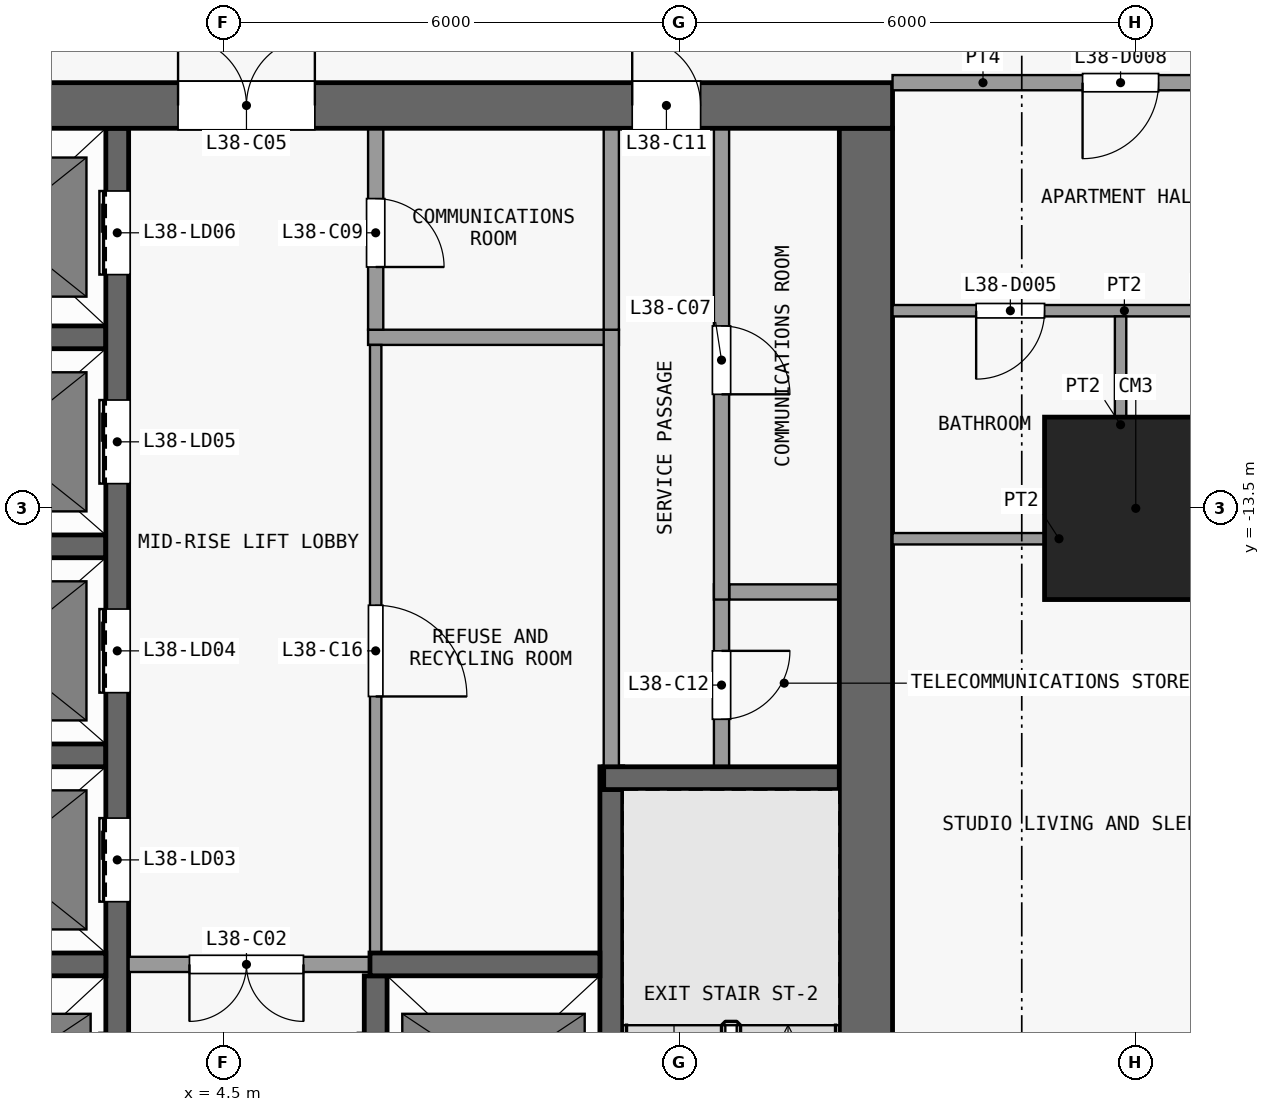
"""IFC4 building model, lengths in metres.
Left out: names, types, materials, properties, quantities, classifications, styles, units other than length and angle.
Written with IfcOpenShell. Run it as: python <this file> out.ifc"""

import sys

from ifc_helpers import new_model, si_unit, direction, frame, frame_2d, origin, origin_2d, place, context, subcontext, project, spatial, rectangle, extrude, element, fill, save


model = new_model("IFC4")
c1 = context("Model", 3, precision=1e-05, world=origin(), true_north=direction((0.0, 1.0)))
c2 = subcontext(c1, "Body", "Model", "MODEL_VIEW")
j1 = project(units=[si_unit("LENGTHUNIT", "METRE"), si_unit("PLANEANGLEUNIT", "RADIAN")], contexts=[c1])
p1 = place(None, origin())
s1 = spatial("IfcSite", under=j1, at=p1, CompositionType="ELEMENT")
p2 = place(p1, origin())
s2 = spatial("IfcBuilding", under=s1, at=p2, CompositionType="ELEMENT")
p3 = place(p2, frame((0.0, 0.0, 156.5)))
s3 = spatial("IfcBuildingStorey", under=s2, at=p3, CompositionType="ELEMENT", Elevation=156.5)
p4 = place(p3, frame((16.5, -13.5, 0.0), z_axis=(0.0, 0.0, 1.0), x_axis=(1.0, 0.0, 0.0)))
e1 = element("IfcColumn", 1, at=p4, inside=s3, PredefinedType="COLUMN", context=c2, shape_type="SweptSolid", body=[
    extrude(rectangle(XDim=2.4, YDim=2.4, at=origin_2d()), origin(), (0.0, 0.0, 1.0), 3.6),
])
p5 = place(p3, frame((-13.3, -8.2, 0.0), z_axis=(0.0, 0.0, 1.0), x_axis=(1.0, 0.0, 0.0)))
e2 = element("IfcWall", 2, at=p5, inside=s3, PredefinedType="SHEAR", context=c2, shape_type="SweptSolid", body=[
    extrude(rectangle(XDim=26.6, YDim=0.6, at=frame_2d((13.3, 0.0))), origin(), (0.0, 0.0, 1.0), 3.3),
])
p6 = place(p5, frame((7.6, 0.0, 0.0)))
e3 = element("IfcOpeningElement", 3, at=p6, cuts=e2, PredefinedType="OPENING", context=c2, shape_type="SweptSolid", body=[
    extrude(rectangle(XDim=1.8, YDim=2.1, at=frame_2d((0.9, 1.05))), frame((0.0, 0.31, 0.0), z_axis=(0.0, -1.0, 0.0), x_axis=(1.0, 0.0, 0.0)), (0.0, 0.0, 1.0), 0.62),
])
p7 = place(p5, frame((17.2, 0.0, 0.0)))
e4 = element("IfcOpeningElement", 4, at=p7, cuts=e2, PredefinedType="OPENING", context=c2, shape_type="SweptSolid", body=[
    extrude(rectangle(XDim=1.8, YDim=2.1, at=frame_2d((0.9, 1.05))), frame((0.0, 0.31, 0.0), z_axis=(0.0, -1.0, 0.0), x_axis=(1.0, 0.0, 0.0)), (0.0, 0.0, 1.0), 0.62),
])
p8 = place(p5, frame((1.525, 0.0, 0.0)))
e5 = element("IfcOpeningElement", 5, at=p8, cuts=e2, PredefinedType="OPENING", context=c2, shape_type="SweptSolid", body=[
    extrude(rectangle(XDim=1.2, YDim=2.1, at=frame_2d((0.6, 1.05))), frame((0.0, 0.31, 0.0), z_axis=(0.0, -1.0, 0.0), x_axis=(1.0, 0.0, 0.0)), (0.0, 0.0, 1.0), 0.62),
])
p9 = place(p5, frame((23.175, 0.0, 0.0)))
e6 = element("IfcOpeningElement", 6, at=p9, cuts=e2, PredefinedType="OPENING", context=c2, shape_type="SweptSolid", body=[
    extrude(rectangle(XDim=0.9, YDim=2.1, at=frame_2d((0.45, 1.05))), frame((0.0, 0.31, 0.0), z_axis=(0.0, -1.0, 0.0), x_axis=(1.0, 0.0, 0.0)), (0.0, 0.0, 1.0), 0.62),
])
p10 = place(p3, frame((12.95, -24.6, 0.0), z_axis=(0.0, 0.0, 1.0), x_axis=(0.0, 1.0, 0.0)))
e7 = element("IfcWall", 7, at=p10, inside=s3, PredefinedType="SHEAR", context=c2, shape_type="SweptSolid", body=[
    extrude(rectangle(XDim=16.1, YDim=0.7, at=frame_2d((8.05, 0.0))), origin(), (0.0, 0.0, 1.0), 3.3),
])
p11 = place(p3, frame((0.15, -19.5, 0.0), z_axis=(0.0, 0.0, 1.0), x_axis=(1.0, 0.0, 0.0)))
e8 = element("IfcWall", 8, at=p11, inside=s3, PredefinedType="SHEAR", context=c2, shape_type="SweptSolid", body=[
    extrude(rectangle(XDim=2.8, YDim=0.3, at=frame_2d((1.4, 0.0))), origin(), (0.0, 0.0, 1.0), 3.3),
])
p12 = place(p3, frame((6.575, -19.5, 0.0), z_axis=(0.0, 0.0, 1.0), x_axis=(-1.0, 0.0, 0.0)))
e9 = element("IfcWall", 9, at=p12, inside=s3, PredefinedType="PARTITIONING", context=c2, shape_type="SweptSolid", body=[
    extrude(rectangle(XDim=3.325, YDim=0.2, at=frame_2d((1.663, 0.0))), origin(), (0.0, 0.0, 1.0), 3.3),
])
p13 = place(p12, frame((1.025, 0.0, 0.0)))
e10 = element("IfcOpeningElement", 10, at=p13, cuts=e9, PredefinedType="OPENING", context=c2, shape_type="SweptSolid", body=[
    extrude(rectangle(XDim=1.5, YDim=2.1, at=frame_2d((0.75, 1.05))), frame((0.0, 0.11, 0.0), z_axis=(0.0, -1.0, 0.0), x_axis=(1.0, 0.0, 0.0)), (0.0, 0.0, 1.0), 0.22),
])
p14 = place(p3, frame((6.425, -19.5, 0.0), z_axis=(0.0, 0.0, 1.0), x_axis=(1.0, 0.0, 0.0)))
e11 = element("IfcWall", 11, at=p14, inside=s3, PredefinedType="SHEAR", context=c2, shape_type="SweptSolid", body=[
    extrude(rectangle(XDim=3.025, YDim=0.3, at=frame_2d((1.512, 0.0))), origin(), (0.0, 0.0, 1.0), 3.3),
])
p15 = place(p3, frame((9.5, -17.05, 0.0), z_axis=(0.0, 0.0, 1.0), x_axis=(1.0, 0.0, 0.0)))
e12 = element("IfcWall", 12, at=p15, inside=s3, PredefinedType="SHEAR", context=c2, shape_type="SweptSolid", body=[
    extrude(rectangle(XDim=3.1, YDim=0.3, at=frame_2d((1.55, 0.0))), origin(), (0.0, 0.0, 1.0), 3.3),
])
p16 = place(p3, frame((0.15, -16.75, 0.0), z_axis=(0.0, 0.0, 1.0), x_axis=(1.0, 0.0, 0.0)))
e13 = element("IfcWall", 13, at=p16, inside=s3, PredefinedType="SHEAR", context=c2, shape_type="SweptSolid", body=[
    extrude(rectangle(XDim=2.8, YDim=0.3, at=frame_2d((1.4, 0.0))), origin(), (0.0, 0.0, 1.0), 3.3),
])
p17 = place(p3, frame((11.15, -14.6, 0.0), z_axis=(0.0, 0.0, 1.0), x_axis=(1.0, 0.0, 0.0)))
e14 = element("IfcWall", 14, at=p17, inside=s3, PredefinedType="PARTITIONING", context=c2, shape_type="SweptSolid", body=[
    extrude(rectangle(XDim=1.45, YDim=0.2, at=frame_2d((0.725, 0.0))), origin(), (0.0, 0.0, 1.0), 3.3),
])
for number, where, z_axis, x_axis in (
    (15, (0.15, -14.0, 0.0), (0.0, 0.0, 1.0), (1.0, 0.0, 0.0)),
    (16, (0.15, -11.25, 0.0), (0.0, 0.0, 1.0), (1.0, 0.0, 0.0)),
):
    element("IfcWall", number, at=place(p3, frame(where, z_axis=z_axis, x_axis=x_axis)), inside=s3, PredefinedType="SHEAR", context=c2, shape_type="SweptSolid", body=[
        extrude(rectangle(XDim=2.8, YDim=0.3, at=frame_2d((1.4, 0.0))), origin(), (0.0, 0.0, 1.0), 3.3),
    ])
p18 = place(p3, frame((6.4, -11.25, 0.0), z_axis=(0.0, 0.0, 1.0), x_axis=(1.0, 0.0, 0.0)))
e17 = element("IfcWall", 17, at=p18, inside=s3, PredefinedType="PARTITIONING", context=c2, shape_type="SweptSolid", body=[
    extrude(rectangle(XDim=3.3, YDim=0.2, at=frame_2d((1.65, 0.0))), origin(), (0.0, 0.0, 1.0), 3.3),
])
p19 = place(p3, frame((3.1, -22.55, 0.0), z_axis=(0.0, 0.0, 1.0), x_axis=(0.0, 1.0, 0.0)))
e18 = element("IfcWall", 18, at=p19, inside=s3, PredefinedType="SHEAR", context=c2, shape_type="SweptSolid", body=[
    extrude(rectangle(XDim=14.05, YDim=0.3, at=frame_2d((7.025, 0.0))), origin(), (0.0, 0.0, 1.0), 3.3),
])
p20 = place(p19, frame((1.05, 0.0, 0.0)))
e19 = element("IfcOpeningElement", 19, at=p20, cuts=e18, PredefinedType="OPENING", context=c2, shape_type="SweptSolid", body=[
    extrude(rectangle(XDim=1.1, YDim=2.1, at=frame_2d((0.55, 1.05))), frame((0.0, 0.16, 0.0), z_axis=(0.0, -1.0, 0.0), x_axis=(1.0, 0.0, 0.0)), (0.0, 0.0, 1.0), 0.32),
])
p21 = place(p19, frame((3.875, 0.0, 0.0)))
e20 = element("IfcOpeningElement", 20, at=p21, cuts=e18, PredefinedType="OPENING", context=c2, shape_type="SweptSolid", body=[
    extrude(rectangle(XDim=1.1, YDim=2.1, at=frame_2d((0.55, 1.05))), frame((0.0, 0.16, 0.0), z_axis=(0.0, -1.0, 0.0), x_axis=(1.0, 0.0, 0.0)), (0.0, 0.0, 1.0), 0.32),
])
p22 = place(p19, frame((6.625, 0.0, 0.0)))
e21 = element("IfcOpeningElement", 21, at=p22, cuts=e18, PredefinedType="OPENING", context=c2, shape_type="SweptSolid", body=[
    extrude(rectangle(XDim=1.1, YDim=2.1, at=frame_2d((0.55, 1.05))), frame((0.0, 0.16, 0.0), z_axis=(0.0, -1.0, 0.0), x_axis=(1.0, 0.0, 0.0)), (0.0, 0.0, 1.0), 0.32),
])
p23 = place(p19, frame((9.375, 0.0, 0.0)))
e22 = element("IfcOpeningElement", 22, at=p23, cuts=e18, PredefinedType="OPENING", context=c2, shape_type="SweptSolid", body=[
    extrude(rectangle(XDim=1.1, YDim=2.1, at=frame_2d((0.55, 1.05))), frame((0.0, 0.16, 0.0), z_axis=(0.0, -1.0, 0.0), x_axis=(1.0, 0.0, 0.0)), (0.0, 0.0, 1.0), 0.32),
])
p24 = place(p19, frame((12.125, 0.0, 0.0)))
e23 = element("IfcOpeningElement", 23, at=p24, cuts=e18, PredefinedType="OPENING", context=c2, shape_type="SweptSolid", body=[
    extrude(rectangle(XDim=1.1, YDim=2.1, at=frame_2d((0.55, 1.05))), frame((0.0, 0.16, 0.0), z_axis=(0.0, -1.0, 0.0), x_axis=(1.0, 0.0, 0.0)), (0.0, 0.0, 1.0), 0.32),
])
p25 = place(p3, frame((6.5, -22.25, 0.0), z_axis=(0.0, 0.0, 1.0), x_axis=(0.0, 1.0, 0.0)))
e24 = element("IfcWall", 24, at=p25, inside=s3, PredefinedType="SHEAR", context=c2, shape_type="SweptSolid", body=[
    extrude(rectangle(XDim=2.6, YDim=0.3, at=frame_2d((1.3, 0.0))), origin(), (0.0, 0.0, 1.0), 3.3),
])
p26 = place(p25, frame((0.75, 0.0, 0.0)))
e25 = element("IfcOpeningElement", 25, at=p26, cuts=e24, PredefinedType="OPENING", context=c2, shape_type="SweptSolid", body=[
    extrude(rectangle(XDim=1.1, YDim=2.1, at=frame_2d((0.55, 1.05))), frame((0.0, 0.16, 0.0), z_axis=(0.0, -1.0, 0.0), x_axis=(1.0, 0.0, 0.0)), (0.0, 0.0, 1.0), 0.32),
])
p27 = place(p3, frame((6.5, -11.35, 0.0), z_axis=(0.0, 0.0, 1.0), x_axis=(0.0, -1.0, 0.0)))
e26 = element("IfcWall", 26, at=p27, inside=s3, PredefinedType="PARTITIONING", context=c2, shape_type="SweptSolid", body=[
    extrude(rectangle(XDim=8.0, YDim=0.15, at=frame_2d((4.0, 0.0))), origin(), (0.0, 0.0, 1.0), 3.3),
])
p28 = place(p27, frame((3.425, 0.0, 0.0)))
e27 = element("IfcOpeningElement", 27, at=p28, cuts=e26, PredefinedType="OPENING", context=c2, shape_type="SweptSolid", body=[
    extrude(rectangle(XDim=1.2, YDim=2.1, at=frame_2d((0.6, 1.05))), frame((0.0, 0.085, 0.0), z_axis=(0.0, -1.0, 0.0), x_axis=(1.0, 0.0, 0.0)), (0.0, 0.0, 1.0), 0.17),
])
p29 = place(p3, frame((6.5, -8.5, 0.0), z_axis=(0.0, 0.0, 1.0), x_axis=(0.0, -1.0, 0.0)))
e28 = element("IfcWall", 28, at=p29, inside=s3, PredefinedType="PARTITIONING", context=c2, shape_type="SweptSolid", body=[
    extrude(rectangle(XDim=2.65, YDim=0.2, at=frame_2d((1.325, 0.0))), origin(), (0.0, 0.0, 1.0), 3.3),
])
p30 = place(p29, frame((0.925, 0.0, 0.0)))
e29 = element("IfcOpeningElement", 29, at=p30, cuts=e28, PredefinedType="OPENING", context=c2, shape_type="SweptSolid", body=[
    extrude(rectangle(XDim=0.9, YDim=2.1, at=frame_2d((0.45, 1.05))), frame((0.0, 0.11, 0.0), z_axis=(0.0, -1.0, 0.0), x_axis=(1.0, 0.0, 0.0)), (0.0, 0.0, 1.0), 0.22),
])
p31 = place(p3, frame((9.6, -16.9, 0.0), z_axis=(0.0, 0.0, 1.0), x_axis=(0.0, -1.0, 0.0)))
e30 = element("IfcWall", 30, at=p31, inside=s3, PredefinedType="SHEAR", context=c2, shape_type="SweptSolid", body=[
    extrude(rectangle(XDim=7.7, YDim=0.3, at=frame_2d((3.85, 0.0))), origin(), (0.0, 0.0, 1.0), 3.3),
])
p32 = place(p31, frame((6.5, 0.0, 0.0)))
e31 = element("IfcOpeningElement", 31, at=p32, cuts=e30, PredefinedType="OPENING", context=c2, shape_type="SweptSolid", body=[
    extrude(rectangle(XDim=1.1, YDim=2.1, at=frame_2d((0.55, 1.05))), frame((0.0, 0.16, 0.0), z_axis=(0.0, -1.0, 0.0), x_axis=(1.0, 0.0, 0.0)), (0.0, 0.0, 1.0), 0.32),
])
p33 = place(p3, frame((9.6, -16.9, 0.0), z_axis=(0.0, 0.0, 1.0), x_axis=(0.0, 1.0, 0.0)))
e32 = element("IfcWall", 32, at=p33, inside=s3, PredefinedType="PARTITIONING", context=c2, shape_type="SweptSolid", body=[
    extrude(rectangle(XDim=5.75, YDim=0.2, at=frame_2d((2.875, 0.0))), origin(), (0.0, 0.0, 1.0), 3.3),
])
p34 = place(p3, frame((9.6, -11.15, 0.0), z_axis=(0.0, 0.0, 1.0), x_axis=(0.0, 1.0, 0.0)))
e33 = element("IfcWall", 33, at=p34, inside=s3, PredefinedType="PARTITIONING", context=c2, shape_type="SweptSolid", body=[
    extrude(rectangle(XDim=2.65, YDim=0.2, at=frame_2d((1.325, 0.0))), origin(), (0.0, 0.0, 1.0), 3.3),
])
p35 = place(p3, frame((11.05, -14.5, 0.0), z_axis=(0.0, 0.0, 1.0), x_axis=(0.0, -1.0, 0.0)))
e34 = element("IfcWall", 34, at=p35, inside=s3, PredefinedType="PARTITIONING", context=c2, shape_type="SweptSolid", body=[
    extrude(rectangle(XDim=2.4, YDim=0.2, at=frame_2d((1.2, 0.0))), origin(), (0.0, 0.0, 1.0), 3.3),
])
p36 = place(p35, frame((0.875, 0.0, 0.0)))
e35 = element("IfcOpeningElement", 35, at=p36, cuts=e34, PredefinedType="OPENING", context=c2, shape_type="SweptSolid", body=[
    extrude(rectangle(XDim=0.9, YDim=2.1, at=frame_2d((0.45, 1.05))), frame((0.0, 0.11, 0.0), z_axis=(0.0, -1.0, 0.0), x_axis=(1.0, 0.0, 0.0)), (0.0, 0.0, 1.0), 0.22),
])
p37 = place(p3, frame((11.05, -8.5, 0.0), z_axis=(0.0, 0.0, 1.0), x_axis=(0.0, -1.0, 0.0)))
e36 = element("IfcWall", 36, at=p37, inside=s3, PredefinedType="PARTITIONING", context=c2, shape_type="SweptSolid", body=[
    extrude(rectangle(XDim=6.2, YDim=0.2, at=frame_2d((3.1, 0.0))), origin(), (0.0, 0.0, 1.0), 3.3),
])
p38 = place(p37, frame((2.6, 0.0, 0.0)))
e37 = element("IfcOpeningElement", 37, at=p38, cuts=e36, PredefinedType="OPENING", context=c2, shape_type="SweptSolid", body=[
    extrude(rectangle(XDim=0.9, YDim=2.1, at=frame_2d((0.45, 1.05))), frame((0.0, 0.11, 0.0), z_axis=(0.0, -1.0, 0.0), x_axis=(1.0, 0.0, 0.0)), (0.0, 0.0, 1.0), 0.22),
])
p39 = place(p3, frame((13.3, -13.9, 0.0), z_axis=(0.0, 0.0, 1.0), x_axis=(1.0, 0.0, 0.0)))
e38 = element("IfcWall", 38, at=p39, inside=s3, PredefinedType="PARTITIONING", context=c2, shape_type="SweptSolid", body=[
    extrude(rectangle(XDim=5.962, YDim=0.15, at=frame_2d((2.981, 0.0))), origin(), (0.0, 0.0, 1.0), 3.3),
])
p40 = place(p39, frame((4.5, 0.0, 0.0)))
e39 = element("IfcOpeningElement", 39, at=p40, cuts=e38, PredefinedType="OPENING", context=c2, shape_type="SweptSolid", body=[
    extrude(rectangle(XDim=0.9, YDim=2.1, at=frame_2d((0.45, 1.05))), frame((0.0, 0.085, 0.0), z_axis=(0.0, -1.0, 0.0), x_axis=(1.0, 0.0, 0.0)), (0.0, 0.0, 1.0), 0.17),
])
p41 = place(p3, frame((13.3, -10.9, 0.0), z_axis=(0.0, 0.0, 1.0), x_axis=(1.0, 0.0, 0.0)))
e40 = element("IfcWall", 40, at=p41, inside=s3, PredefinedType="PARTITIONING", context=c2, shape_type="SweptSolid", body=[
    extrude(rectangle(XDim=5.962, YDim=0.15, at=frame_2d((2.981, 0.0))), origin(), (0.0, 0.0, 1.0), 3.3),
])
p42 = place(p41, frame((1.1, 0.0, 0.0)))
e41 = element("IfcOpeningElement", 41, at=p42, cuts=e40, PredefinedType="OPENING", context=c2, shape_type="SweptSolid", body=[
    extrude(rectangle(XDim=0.9, YDim=2.1, at=frame_2d((0.45, 1.05))), frame((0.0, 0.085, 0.0), z_axis=(0.0, -1.0, 0.0), x_axis=(1.0, 0.0, 0.0)), (0.0, 0.0, 1.0), 0.17),
])
p43 = place(p41, frame((4.1, 0.0, 0.0)))
e42 = element("IfcOpeningElement", 42, at=p43, cuts=e40, PredefinedType="OPENING", context=c2, shape_type="SweptSolid", body=[
    extrude(rectangle(XDim=0.9, YDim=2.1, at=frame_2d((0.45, 1.05))), frame((0.0, 0.085, 0.0), z_axis=(0.0, -1.0, 0.0), x_axis=(1.0, 0.0, 0.0)), (0.0, 0.0, 1.0), 0.17),
])
p44 = place(p3, frame((13.3, -7.9, 0.0), z_axis=(0.0, 0.0, 1.0), x_axis=(1.0, 0.0, 0.0)))
e43 = element("IfcWall", 43, at=p44, inside=s3, PredefinedType="PARTITIONING", context=c2, shape_type="SweptSolid", body=[
    extrude(rectangle(XDim=5.962, YDim=0.2, at=frame_2d((2.981, 0.0))), origin(), (0.0, 0.0, 1.0), 3.3),
])
p45 = place(p44, frame((2.5, 0.0, 0.0)))
e44 = element("IfcOpeningElement", 44, at=p45, cuts=e43, PredefinedType="OPENING", context=c2, shape_type="SweptSolid", body=[
    extrude(rectangle(XDim=1.0, YDim=2.1, at=frame_2d((0.5, 1.05))), frame((0.0, 0.11, 0.0), z_axis=(0.0, -1.0, 0.0), x_axis=(1.0, 0.0, 0.0)), (0.0, 0.0, 1.0), 0.22),
])
p46 = place(p3, frame((16.3, -13.825, 0.0), z_axis=(0.0, 0.0, 1.0), x_axis=(0.0, 1.0, 0.0)))
e45 = element("IfcWall", 45, at=p46, inside=s3, PredefinedType="PARTITIONING", context=c2, shape_type="SweptSolid", body=[
    extrude(rectangle(XDim=2.85, YDim=0.15, at=frame_2d((1.425, 0.0))), origin(), (0.0, 0.0, 1.0), 3.3),
])
p47 = place(p21, origin())
e46 = element("IfcDoor", 46, at=p47, inside=s3, OperationType="DOUBLE_DOOR_SLIDING", PredefinedType="DOOR", context=c2, shape_type="SweptSolid", body=[
    extrude(rectangle(XDim=1.1, YDim=2.1, at=frame_2d((0.55, 1.05))), frame((0.0, 0.025, 0.0), z_axis=(0.0, -1.0, 0.0), x_axis=(1.0, 0.0, 0.0)), (0.0, 0.0, 1.0), 0.05),
])
fill(e20, e46)
p48 = place(p22, origin())
e47 = element("IfcDoor", 47, at=p48, inside=s3, OperationType="DOUBLE_DOOR_SLIDING", PredefinedType="DOOR", context=c2, shape_type="SweptSolid", body=[
    extrude(rectangle(XDim=1.1, YDim=2.1, at=frame_2d((0.55, 1.05))), frame((0.0, 0.025, 0.0), z_axis=(0.0, -1.0, 0.0), x_axis=(1.0, 0.0, 0.0)), (0.0, 0.0, 1.0), 0.05),
])
fill(e21, e47)
p49 = place(p23, origin())
e48 = element("IfcDoor", 48, at=p49, inside=s3, OperationType="DOUBLE_DOOR_SLIDING", PredefinedType="DOOR", context=c2, shape_type="SweptSolid", body=[
    extrude(rectangle(XDim=1.1, YDim=2.1, at=frame_2d((0.55, 1.05))), frame((0.0, 0.025, 0.0), z_axis=(0.0, -1.0, 0.0), x_axis=(1.0, 0.0, 0.0)), (0.0, 0.0, 1.0), 0.05),
])
fill(e22, e48)
p50 = place(p24, origin())
e49 = element("IfcDoor", 49, at=p50, inside=s3, OperationType="DOUBLE_DOOR_SLIDING", PredefinedType="DOOR", context=c2, shape_type="SweptSolid", body=[
    extrude(rectangle(XDim=1.1, YDim=2.1, at=frame_2d((0.55, 1.05))), frame((0.0, 0.025, 0.0), z_axis=(0.0, -1.0, 0.0), x_axis=(1.0, 0.0, 0.0)), (0.0, 0.0, 1.0), 0.05),
])
fill(e23, e49)
p51 = place(p13, origin())
e50 = element("IfcDoor", 50, at=p51, inside=s3, OperationType="DOUBLE_DOOR_SINGLE_SWING", PredefinedType="DOOR", context=c2, shape_type="SweptSolid", body=[
    extrude(rectangle(XDim=1.5, YDim=2.1, at=frame_2d((0.75, 1.05))), frame((0.0, 0.025, 0.0), z_axis=(0.0, -1.0, 0.0), x_axis=(1.0, 0.0, 0.0)), (0.0, 0.0, 1.0), 0.05),
])
fill(e10, e50)
p52 = place(p7, origin())
e51 = element("IfcDoor", 51, at=p52, inside=s3, OperationType="DOUBLE_DOOR_SINGLE_SWING", PredefinedType="DOOR", context=c2, shape_type="SweptSolid", body=[
    extrude(rectangle(XDim=1.8, YDim=2.1, at=frame_2d((0.9, 1.05))), frame((0.0, 0.025, 0.0), z_axis=(0.0, -1.0, 0.0), x_axis=(1.0, 0.0, 0.0)), (0.0, 0.0, 1.0), 0.05),
])
fill(e4, e51)
p53 = place(p38, origin())
e52 = element("IfcDoor", 52, at=p53, inside=s3, OperationType="SINGLE_SWING_RIGHT", PredefinedType="DOOR", context=c2, shape_type="SweptSolid", body=[
    extrude(rectangle(XDim=0.9, YDim=2.1, at=frame_2d((0.45, 1.05))), frame((0.0, 0.025, 0.0), z_axis=(0.0, -1.0, 0.0), x_axis=(1.0, 0.0, 0.0)), (0.0, 0.0, 1.0), 0.05),
])
fill(e37, e52)
p54 = place(p30, origin())
e53 = element("IfcDoor", 53, at=p54, inside=s3, OperationType="SINGLE_SWING_RIGHT", PredefinedType="DOOR", context=c2, shape_type="SweptSolid", body=[
    extrude(rectangle(XDim=0.9, YDim=2.1, at=frame_2d((0.45, 1.05))), frame((0.0, 0.025, 0.0), z_axis=(0.0, -1.0, 0.0), x_axis=(1.0, 0.0, 0.0)), (0.0, 0.0, 1.0), 0.05),
])
fill(e29, e53)
p55 = place(p9, origin())
e54 = element("IfcDoor", 54, at=p55, inside=s3, OperationType="SINGLE_SWING_LEFT", PredefinedType="DOOR", context=c2, shape_type="SweptSolid", body=[
    extrude(rectangle(XDim=0.9, YDim=2.1, at=frame_2d((0.45, 1.05))), frame((0.0, 0.025, 0.0), z_axis=(0.0, -1.0, 0.0), x_axis=(1.0, 0.0, 0.0)), (0.0, 0.0, 1.0), 0.05),
])
fill(e6, e54)
p56 = place(p36, origin())
e55 = element("IfcDoor", 55, at=p56, inside=s3, OperationType="SINGLE_SWING_LEFT", PredefinedType="DOOR", context=c2, shape_type="SweptSolid", body=[
    extrude(rectangle(XDim=0.9, YDim=2.1, at=frame_2d((0.45, 1.05))), frame((0.0, 0.025, 0.0), z_axis=(0.0, -1.0, 0.0), x_axis=(1.0, 0.0, 0.0)), (0.0, 0.0, 1.0), 0.05),
])
fill(e35, e55)
p57 = place(p28, origin())
e56 = element("IfcDoor", 56, at=p57, inside=s3, OperationType="SINGLE_SWING_RIGHT", PredefinedType="DOOR", context=c2, shape_type="SweptSolid", body=[
    extrude(rectangle(XDim=1.2, YDim=2.1, at=frame_2d((0.6, 1.05))), frame((0.0, 0.025, 0.0), z_axis=(0.0, -1.0, 0.0), x_axis=(1.0, 0.0, 0.0)), (0.0, 0.0, 1.0), 0.05),
])
fill(e27, e56)
p58 = place(p42, origin())
e57 = element("IfcDoor", 57, at=p58, inside=s3, OperationType="SINGLE_SWING_LEFT", PredefinedType="DOOR", context=c2, shape_type="SweptSolid", body=[
    extrude(rectangle(XDim=0.9, YDim=2.1, at=frame_2d((0.45, 1.05))), frame((0.0, 0.025, 0.0), z_axis=(0.0, -1.0, 0.0), x_axis=(1.0, 0.0, 0.0)), (0.0, 0.0, 1.0), 0.05),
])
fill(e41, e57)
p59 = place(p45, origin())
e58 = element("IfcDoor", 58, at=p59, inside=s3, OperationType="SINGLE_SWING_LEFT", PredefinedType="DOOR", context=c2, shape_type="SweptSolid", body=[
    extrude(rectangle(XDim=1.0, YDim=2.1, at=frame_2d((0.5, 1.05))), frame((0.0, 0.025, 0.0), z_axis=(0.0, -1.0, 0.0), x_axis=(1.0, 0.0, 0.0)), (0.0, 0.0, 1.0), 0.05),
])
fill(e44, e58)
save(model, sys.argv[1])
